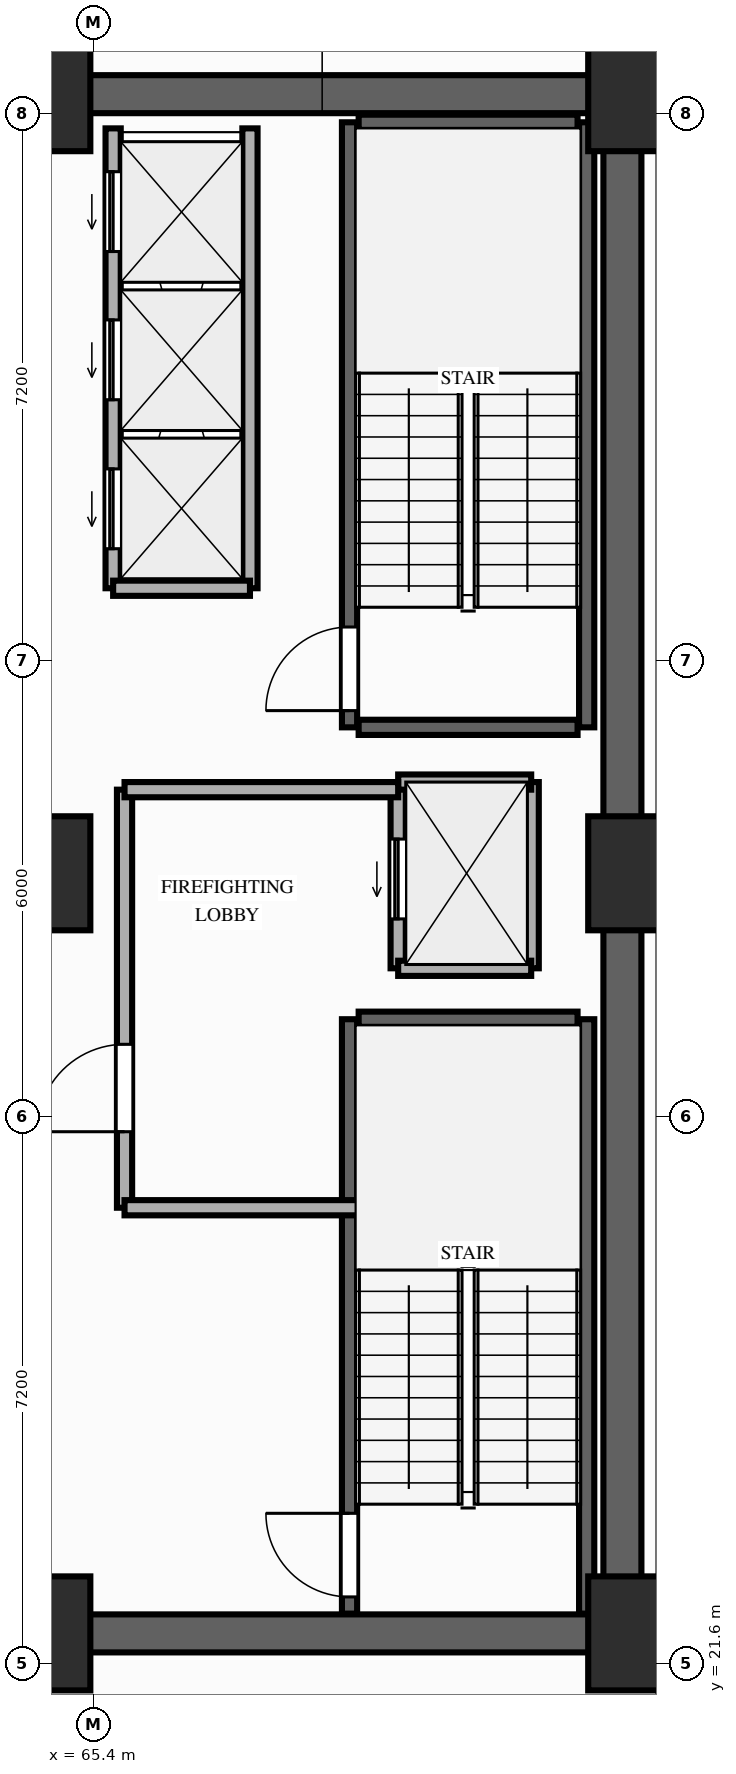
"""IFC4 building model, lengths in metres.
Left out: names, types, materials, properties, quantities, classifications, styles, units other than length and angle.
Written with IfcOpenShell. Run it as: python <this file> out.ifc"""

import sys

from ifc_helpers import new_model, si_unit, direction, frame, frame_2d, origin, origin_2d, place, context, subcontext, project, spatial, rectangle, extrude, element, fill, save


model = new_model("IFC4")
c1 = context("Model", 3, precision=1e-05, world=origin(), true_north=direction((0.0, 1.0)))
c2 = subcontext(c1, "Body", "Model", "MODEL_VIEW")
j1 = project(units=[si_unit("LENGTHUNIT", "METRE"), si_unit("PLANEANGLEUNIT", "RADIAN")], contexts=[c1])
p1 = place(None, origin())
s1 = spatial("IfcSite", under=j1, at=p1, CompositionType="ELEMENT")
p2 = place(p1, origin())
s2 = spatial("IfcBuilding", under=s1, at=p2, CompositionType="ELEMENT")
p3 = place(p2, frame((0.0, 0.0, 17.6)))
s3 = spatial("IfcBuildingStorey", under=s2, at=p3, CompositionType="ELEMENT", Elevation=17.6)
for number, where, z_axis, x_axis in (
    (1, (64.6, 22.0, 0.0), (0.0, 0.0, 1.0), (1.0, 0.0, 0.0)),
    (2, (72.65, 22.0, 0.0), (0.0, 0.0, 1.0), (1.0, 0.0, 0.0)),
    (3, (64.6, 32.0, 0.0), (0.0, 0.0, 1.0), (1.0, 0.0, 0.0)),
    (4, (72.65, 32.0, 0.0), (0.0, 0.0, 1.0), (1.0, 0.0, 0.0)),
    (5, (64.6, 42.25, 0.0), (0.0, 0.0, 1.0), (1.0, 0.0, 0.0)),
    (6, (72.65, 42.25, 0.0), (0.0, 0.0, 1.0), (1.0, 0.0, 0.0)),
):
    element("IfcColumn", number, at=place(p3, frame(where, z_axis=z_axis, x_axis=x_axis)), inside=s3, PredefinedType="COLUMN", context=c2, shape_type="SweptSolid", body=[
        extrude(rectangle(XDim=1.5, YDim=1.5, at=origin_2d()), origin(), (0.0, 0.0, 1.0), 4.2),
    ])
p4 = place(p3, frame((72.35, 22.0, 0.0), z_axis=(0.0, 0.0, 1.0), x_axis=(0.0, 1.0, 0.0)))
e7 = element("IfcWall", 7, at=p4, inside=s3, PredefinedType="SHEAR", context=c2, shape_type="SweptSolid", body=[
    extrude(rectangle(XDim=20.25, YDim=0.5, at=frame_2d((10.125, 0.0))), origin(), (0.0, 0.0, 1.0), 3.9),
])
for number, where, z_axis, x_axis in (
    (8, (64.6, 42.25, 0.0), (0.0, 0.0, 1.0), (1.0, 0.0, 0.0)),
    (9, (64.6, 22.0, 0.0), (0.0, 0.0, 1.0), (1.0, 0.0, 0.0)),
):
    element("IfcWall", number, at=place(p3, frame(where, z_axis=z_axis, x_axis=x_axis)), inside=s3, PredefinedType="SHEAR", context=c2, shape_type="SweptSolid", body=[
        extrude(rectangle(XDim=7.5, YDim=0.5, at=frame_2d((3.75, 0.0))), origin(), (0.0, 0.0, 1.0), 3.9),
    ])
p5 = place(p3, frame((68.76, 22.26, 0.0), z_axis=(0.0, 0.0, 1.0), x_axis=(0.0, 1.0, 0.0)))
e10 = element("IfcWall", 10, at=p5, inside=s3, PredefinedType="SHEAR", context=c2, shape_type="SweptSolid", body=[
    extrude(rectangle(XDim=7.82, YDim=0.2, at=frame_2d((3.91, 0.0))), origin(), (0.0, 0.0, 1.0), 3.9),
])
p6 = place(p5, frame((0.22, 0.0, 0.0)))
e11 = element("IfcOpeningElement", 11, at=p6, cuts=e10, PredefinedType="OPENING", context=c2, shape_type="SweptSolid", body=[
    extrude(rectangle(XDim=1.1, YDim=2.15, at=frame_2d((0.55, 1.075))), frame((0.0, 0.11, 0.0), z_axis=(0.0, -1.0, 0.0), x_axis=(1.0, 0.0, 0.0)), (0.0, 0.0, 1.0), 0.22),
])
p7 = place(p3, frame((71.88, 22.26, 0.0), z_axis=(0.0, 0.0, 1.0), x_axis=(0.0, 1.0, 0.0)))
e12 = element("IfcWall", 12, at=p7, inside=s3, PredefinedType="SHEAR", context=c2, shape_type="SweptSolid", body=[
    extrude(rectangle(XDim=7.82, YDim=0.2, at=frame_2d((3.91, 0.0))), origin(), (0.0, 0.0, 1.0), 3.9),
])
p8 = place(p3, frame((68.88, 30.08, 0.0), z_axis=(0.0, 0.0, 1.0), x_axis=(1.0, 0.0, 0.0)))
e13 = element("IfcWall", 13, at=p8, inside=s3, PredefinedType="SHEAR", context=c2, shape_type="SweptSolid", body=[
    extrude(rectangle(XDim=2.88, YDim=0.2, at=frame_2d((1.44, 0.0))), origin(), (0.0, 0.0, 1.0), 3.9),
])
p9 = place(p3, frame((68.76, 33.92, 0.0), z_axis=(0.0, 0.0, 1.0), x_axis=(0.0, 1.0, 0.0)))
e14 = element("IfcWall", 14, at=p9, inside=s3, PredefinedType="SHEAR", context=c2, shape_type="SweptSolid", body=[
    extrude(rectangle(XDim=7.96, YDim=0.2, at=frame_2d((3.98, 0.0))), origin(), (0.0, 0.0, 1.0), 3.9),
])
p10 = place(p9, frame((0.22, 0.0, 0.0)))
e15 = element("IfcOpeningElement", 15, at=p10, cuts=e14, PredefinedType="OPENING", context=c2, shape_type="SweptSolid", body=[
    extrude(rectangle(XDim=1.1, YDim=2.15, at=frame_2d((0.55, 1.075))), frame((0.0, 0.11, 0.0), z_axis=(0.0, -1.0, 0.0), x_axis=(1.0, 0.0, 0.0)), (0.0, 0.0, 1.0), 0.22),
])
p11 = place(p3, frame((71.88, 33.92, 0.0), z_axis=(0.0, 0.0, 1.0), x_axis=(0.0, 1.0, 0.0)))
e16 = element("IfcWall", 16, at=p11, inside=s3, PredefinedType="SHEAR", context=c2, shape_type="SweptSolid", body=[
    extrude(rectangle(XDim=7.96, YDim=0.2, at=frame_2d((3.98, 0.0))), origin(), (0.0, 0.0, 1.0), 3.9),
])
for number, where, z_axis, x_axis in (
    (17, (68.88, 41.88, 0.0), (0.0, 0.0, 1.0), (1.0, 0.0, 0.0)),
    (18, (68.88, 33.92, 0.0), (0.0, 0.0, 1.0), (1.0, 0.0, 0.0)),
):
    element("IfcWall", number, at=place(p3, frame(where, z_axis=z_axis, x_axis=x_axis)), inside=s3, PredefinedType="SHEAR", context=c2, shape_type="SweptSolid", body=[
        extrude(rectangle(XDim=2.88, YDim=0.2, at=frame_2d((1.44, 0.0))), origin(), (0.0, 0.0, 1.0), 3.9),
    ])
p12 = place(p3, frame((65.65, 35.75, 0.0), z_axis=(0.0, 0.0, 1.0), x_axis=(0.0, 1.0, 0.0)))
e19 = element("IfcWall", 19, at=p12, inside=s3, PredefinedType="MOVABLE", context=c2, shape_type="SweptSolid", body=[
    extrude(rectangle(XDim=6.05, YDim=0.2, at=frame_2d((3.025, 0.0))), origin(), (0.0, 0.0, 1.0), 3.9),
])
p13 = place(p12, frame((0.52, 0.0, 0.0)))
e20 = element("IfcOpeningElement", 20, at=p13, cuts=e19, PredefinedType="OPENING", context=c2, shape_type="SweptSolid", body=[
    extrude(rectangle(XDim=1.05, YDim=2.15, at=frame_2d((0.525, 1.075))), frame((0.0, 0.11, 0.0), z_axis=(0.0, -1.0, 0.0), x_axis=(1.0, 0.0, 0.0)), (0.0, 0.0, 1.0), 0.22),
])
p14 = place(p12, frame((2.48, 0.0, 0.0)))
e21 = element("IfcOpeningElement", 21, at=p14, cuts=e19, PredefinedType="OPENING", context=c2, shape_type="SweptSolid", body=[
    extrude(rectangle(XDim=1.05, YDim=2.15, at=frame_2d((0.525, 1.075))), frame((0.0, 0.11, 0.0), z_axis=(0.0, -1.0, 0.0), x_axis=(1.0, 0.0, 0.0)), (0.0, 0.0, 1.0), 0.22),
])
p15 = place(p12, frame((4.43, 0.0, 0.0)))
e22 = element("IfcOpeningElement", 22, at=p15, cuts=e19, PredefinedType="OPENING", context=c2, shape_type="SweptSolid", body=[
    extrude(rectangle(XDim=1.05, YDim=2.15, at=frame_2d((0.525, 1.075))), frame((0.0, 0.11, 0.0), z_axis=(0.0, -1.0, 0.0), x_axis=(1.0, 0.0, 0.0)), (0.0, 0.0, 1.0), 0.22),
])
p16 = place(p3, frame((67.45, 35.75, 0.0), z_axis=(0.0, 0.0, 1.0), x_axis=(0.0, 1.0, 0.0)))
e23 = element("IfcWall", 23, at=p16, inside=s3, PredefinedType="MOVABLE", context=c2, shape_type="SweptSolid", body=[
    extrude(rectangle(XDim=6.05, YDim=0.2, at=frame_2d((3.025, 0.0))), origin(), (0.0, 0.0, 1.0), 3.9),
])
p17 = place(p3, frame((65.65, 35.75, 0.0), z_axis=(0.0, 0.0, 1.0), x_axis=(1.0, 0.0, 0.0)))
e24 = element("IfcWall", 24, at=p17, inside=s3, PredefinedType="MOVABLE", context=c2, shape_type="SweptSolid", body=[
    extrude(rectangle(XDim=1.8, YDim=0.2, at=frame_2d((0.9, 0.0))), origin(), (0.0, 0.0, 1.0), 3.9),
])
p18 = place(p3, frame((69.4, 30.75, 0.0), z_axis=(0.0, 0.0, 1.0), x_axis=(0.0, 1.0, 0.0)))
e25 = element("IfcWall", 25, at=p18, inside=s3, PredefinedType="MOVABLE", context=c2, shape_type="SweptSolid", body=[
    extrude(rectangle(XDim=2.45, YDim=0.2, at=frame_2d((1.225, 0.0))), origin(), (0.0, 0.0, 1.0), 3.9),
])
p19 = place(p18, frame((0.65, 0.0, 0.0)))
e26 = element("IfcOpeningElement", 26, at=p19, cuts=e25, PredefinedType="OPENING", context=c2, shape_type="SweptSolid", body=[
    extrude(rectangle(XDim=1.05, YDim=2.15, at=frame_2d((0.525, 1.075))), frame((0.0, 0.11, 0.0), z_axis=(0.0, -1.0, 0.0), x_axis=(1.0, 0.0, 0.0)), (0.0, 0.0, 1.0), 0.22),
])
p20 = place(p3, frame((71.15, 30.75, 0.0), z_axis=(0.0, 0.0, 1.0), x_axis=(0.0, 1.0, 0.0)))
e27 = element("IfcWall", 27, at=p20, inside=s3, PredefinedType="MOVABLE", context=c2, shape_type="SweptSolid", body=[
    extrude(rectangle(XDim=2.45, YDim=0.2, at=frame_2d((1.225, 0.0))), origin(), (0.0, 0.0, 1.0), 3.9),
])
for number, where, z_axis, x_axis in (
    (28, (69.4, 33.2, 0.0), (0.0, 0.0, 1.0), (1.0, 0.0, 0.0)),
    (29, (69.4, 30.75, 0.0), (0.0, 0.0, 1.0), (1.0, 0.0, 0.0)),
):
    element("IfcWall", number, at=place(p3, frame(where, z_axis=z_axis, x_axis=x_axis)), inside=s3, PredefinedType="MOVABLE", context=c2, shape_type="SweptSolid", body=[
        extrude(rectangle(XDim=1.75, YDim=0.2, at=frame_2d((0.875, 0.0))), origin(), (0.0, 0.0, 1.0), 3.9),
    ])
p21 = place(p3, frame((65.8, 27.6, 0.0), z_axis=(0.0, 0.0, 1.0), x_axis=(0.0, 1.0, 0.0)))
e30 = element("IfcWall", 30, at=p21, inside=s3, PredefinedType="PARTITIONING", context=c2, shape_type="SweptSolid", body=[
    extrude(rectangle(XDim=5.5, YDim=0.2, at=frame_2d((2.75, 0.0))), origin(), (0.0, 0.0, 1.0), 3.9),
])
p22 = place(p21, frame((1.0, 0.0, 0.0)))
e31 = element("IfcOpeningElement", 31, at=p22, cuts=e30, PredefinedType="OPENING", context=c2, shape_type="SweptSolid", body=[
    extrude(rectangle(XDim=1.15, YDim=2.15, at=frame_2d((0.575, 1.075))), frame((0.0, 0.11, 0.0), z_axis=(0.0, -1.0, 0.0), x_axis=(1.0, 0.0, 0.0)), (0.0, 0.0, 1.0), 0.22),
])
p23 = place(p3, frame((65.8, 33.1, 0.0), z_axis=(0.0, 0.0, 1.0), x_axis=(1.0, 0.0, 0.0)))
e32 = element("IfcWall", 32, at=p23, inside=s3, PredefinedType="PARTITIONING", context=c2, shape_type="SweptSolid", body=[
    extrude(rectangle(XDim=3.6, YDim=0.2, at=frame_2d((1.8, 0.0))), origin(), (0.0, 0.0, 1.0), 3.9),
])
p24 = place(p3, frame((65.8, 27.6, 0.0), z_axis=(0.0, 0.0, 1.0), x_axis=(1.0, 0.0, 0.0)))
e33 = element("IfcWall", 33, at=p24, inside=s3, PredefinedType="PARTITIONING", context=c2, shape_type="SweptSolid", body=[
    extrude(rectangle(XDim=3.4, YDim=0.2, at=frame_2d((1.7, 0.0))), origin(), (0.0, 0.0, 1.0), 3.9),
])
p25 = place(p6, origin())
e34 = element("IfcDoor", 34, at=p25, inside=s3, OperationType="SINGLE_SWING_RIGHT", PredefinedType="DOOR", context=c2, shape_type="SweptSolid", body=[
    extrude(rectangle(XDim=1.1, YDim=2.15, at=frame_2d((0.55, 1.075))), frame((0.0, 0.025, 0.0), z_axis=(0.0, -1.0, 0.0), x_axis=(1.0, 0.0, 0.0)), (0.0, 0.0, 1.0), 0.05),
])
fill(e11, e34)
p26 = place(p10, origin())
e35 = element("IfcDoor", 35, at=p26, inside=s3, OperationType="SINGLE_SWING_LEFT", PredefinedType="DOOR", context=c2, shape_type="SweptSolid", body=[
    extrude(rectangle(XDim=1.1, YDim=2.15, at=frame_2d((0.55, 1.075))), frame((0.0, 0.025, 0.0), z_axis=(0.0, -1.0, 0.0), x_axis=(1.0, 0.0, 0.0)), (0.0, 0.0, 1.0), 0.05),
])
fill(e15, e35)
p27 = place(p13, origin())
e36 = element("IfcDoor", 36, at=p27, inside=s3, OperationType="SLIDING_TO_LEFT", PredefinedType="DOOR", context=c2, shape_type="SweptSolid", body=[
    extrude(rectangle(XDim=1.05, YDim=2.15, at=frame_2d((0.525, 1.075))), frame((0.0, 0.025, 0.0), z_axis=(0.0, -1.0, 0.0), x_axis=(1.0, 0.0, 0.0)), (0.0, 0.0, 1.0), 0.05),
])
fill(e20, e36)
p28 = place(p14, origin())
e37 = element("IfcDoor", 37, at=p28, inside=s3, OperationType="SLIDING_TO_LEFT", PredefinedType="DOOR", context=c2, shape_type="SweptSolid", body=[
    extrude(rectangle(XDim=1.05, YDim=2.15, at=frame_2d((0.525, 1.075))), frame((0.0, 0.025, 0.0), z_axis=(0.0, -1.0, 0.0), x_axis=(1.0, 0.0, 0.0)), (0.0, 0.0, 1.0), 0.05),
])
fill(e21, e37)
p29 = place(p15, origin())
e38 = element("IfcDoor", 38, at=p29, inside=s3, OperationType="SLIDING_TO_LEFT", PredefinedType="DOOR", context=c2, shape_type="SweptSolid", body=[
    extrude(rectangle(XDim=1.05, YDim=2.15, at=frame_2d((0.525, 1.075))), frame((0.0, 0.025, 0.0), z_axis=(0.0, -1.0, 0.0), x_axis=(1.0, 0.0, 0.0)), (0.0, 0.0, 1.0), 0.05),
])
fill(e22, e38)
p30 = place(p19, origin())
e39 = element("IfcDoor", 39, at=p30, inside=s3, OperationType="SLIDING_TO_LEFT", PredefinedType="DOOR", context=c2, shape_type="SweptSolid", body=[
    extrude(rectangle(XDim=1.05, YDim=2.15, at=frame_2d((0.525, 1.075))), frame((0.0, 0.025, 0.0), z_axis=(0.0, -1.0, 0.0), x_axis=(1.0, 0.0, 0.0)), (0.0, 0.0, 1.0), 0.05),
])
fill(e26, e39)
p31 = place(p22, origin())
e40 = element("IfcDoor", 40, at=p31, inside=s3, OperationType="SINGLE_SWING_LEFT", PredefinedType="DOOR", context=c2, shape_type="SweptSolid", body=[
    extrude(rectangle(XDim=1.15, YDim=2.15, at=frame_2d((0.575, 1.075))), frame((0.0, 0.025, 0.0), z_axis=(0.0, -1.0, 0.0), x_axis=(1.0, 0.0, 0.0)), (0.0, 0.0, 1.0), 0.05),
])
fill(e31, e40)
save(model, sys.argv[1])
